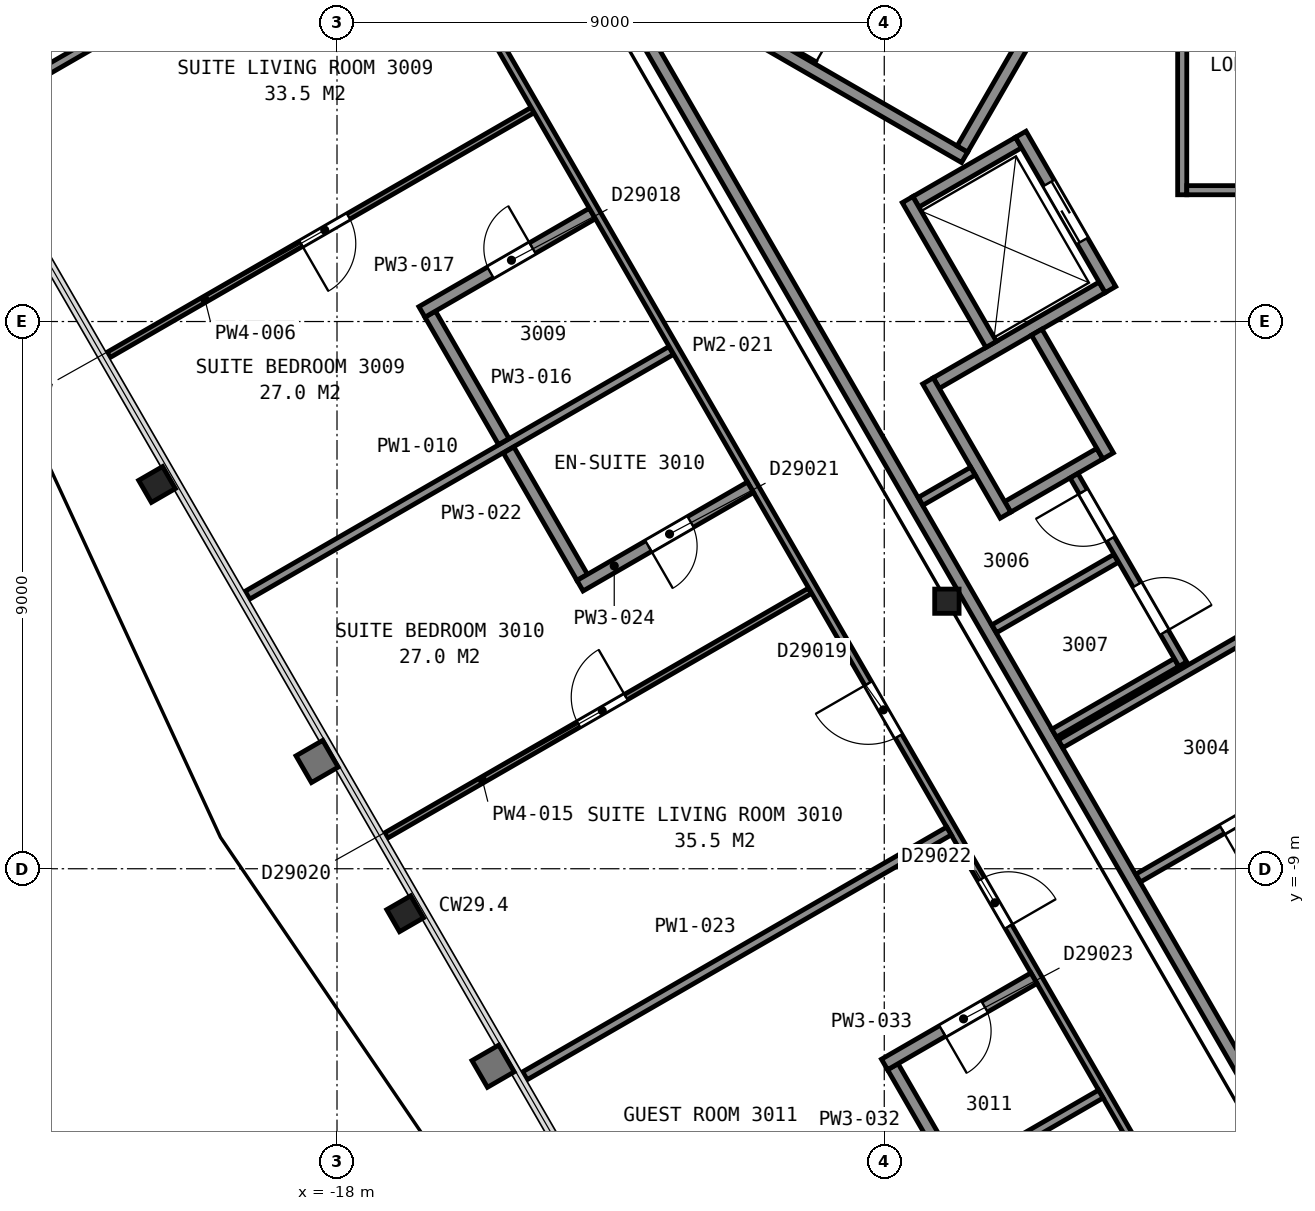
"""IFC4 building model, lengths in metres.
Left out: names, types, materials, properties, quantities, classifications, styles, units other than length and angle.
Written with IfcOpenShell. Run it as: python <this file> out.ifc"""

import sys

from ifc_helpers import new_model, si_unit, direction, frame, frame_2d, origin, origin_2d, place, context, subcontext, project, spatial, rectangle, i_section, extrude, element, fill, save


model = new_model("IFC4")
c1 = context("Model", 3, precision=1e-05, world=origin(), true_north=direction((0.0, 1.0)))
c2 = subcontext(c1, "Body", "Model", "MODEL_VIEW")
j1 = project(units=[si_unit("LENGTHUNIT", "METRE"), si_unit("PLANEANGLEUNIT", "RADIAN")], contexts=[c1])
p1 = place(None, origin())
s1 = spatial("IfcSite", under=j1, at=p1, CompositionType="ELEMENT")
p2 = place(p1, origin())
s2 = spatial("IfcBuilding", under=s1, at=p2, CompositionType="ELEMENT")
p3 = place(p2, frame((0.0, 0.0, 125.2)))
s3 = spatial("IfcBuildingStorey", under=s2, at=p3, CompositionType="ELEMENT", Elevation=125.2)
p4 = place(p3, frame((-20.96, -2.68, 0.0), z_axis=(0.0, 0.0, 1.0), x_axis=(-0.5, 0.866025403784, 0.0)))
e1 = element("IfcColumn", 1, at=p4, inside=s3, PredefinedType="COLUMN", context=c2, shape_type="SweptSolid", body=[
    extrude(i_section(OverallWidth=0.419, OverallDepth=0.455, WebThickness=0.042, FlangeThickness=0.068, FilletRadius=0.015, at=origin_2d()), origin(), (0.0, 0.0, 1.0), 3.56),
])
p5 = place(p3, frame((-16.88, -9.74, 0.0), z_axis=(0.0, 0.0, 1.0), x_axis=(-0.5, 0.866025403784, 0.0)))
e2 = element("IfcColumn", 2, at=p5, inside=s3, PredefinedType="COLUMN", context=c2, shape_type="SweptSolid", body=[
    extrude(i_section(OverallWidth=0.419, OverallDepth=0.455, WebThickness=0.042, FlangeThickness=0.068, FilletRadius=0.015, at=origin_2d()), origin(), (0.0, 0.0, 1.0), 3.565),
])
p6 = place(p3, frame((-7.97, -4.6, 0.0), z_axis=(0.0, 0.0, 1.0), x_axis=(1.0, 0.0, 0.0)))
e3 = element("IfcColumn", 3, at=p6, inside=s3, PredefinedType="COLUMN", context=c2, shape_type="SweptSolid", body=[
    extrude(i_section(OverallWidth=0.401, OverallDepth=0.399, WebThickness=0.025, FlangeThickness=0.04, FilletRadius=0.015, at=origin_2d()), origin(), (0.0, 0.0, 1.0), 3.6),
])
p7 = place(p3, frame((-7.678, 2.701, 0.0), z_axis=(0.0, 0.0, 1.0), x_axis=(-0.866026010844, 0.49999894854, 0.0)))
e4 = element("IfcWall", 4, at=p7, inside=s3, PredefinedType="PARTITIONING", context=c2, shape_type="SweptSolid", body=[
    extrude(rectangle(XDim=12.0, YDim=0.2, at=frame_2d((6.0, 0.0))), origin(), (0.0, 0.0, 1.0), 3.35),
])
p8 = place(p3, frame((-6.315, 5.262, 0.0), z_axis=(0.0, 0.0, 1.0), x_axis=(-0.500049511043, -0.865996816683, 0.0)))
e5 = element("IfcWall", 5, at=p8, inside=s3, PredefinedType="PARTITIONING", context=c2, shape_type="SweptSolid", body=[
    extrude(rectangle(XDim=2.8, YDim=0.2, at=frame_2d((1.4, 0.0))), origin(), (0.0, 0.0, 1.0), 3.35),
])
p9 = place(p3, frame((-6.97, -3.048, 0.0), z_axis=(0.0, 0.0, 1.0), x_axis=(0.866036909293, 0.499980071345, 0.0)))
e6 = element("IfcWall", 6, at=p9, inside=s3, PredefinedType="PARTITIONING", context=c2, shape_type="SweptSolid", body=[
    extrude(rectangle(XDim=1.75, YDim=0.2, at=frame_2d((0.875, 0.0))), origin(), (0.0, 0.0, 1.0), 3.6),
])
p10 = place(p3, frame((-8.145, -1.013, 0.0), z_axis=(0.0, 0.0, 1.0), x_axis=(0.866016494683, 0.500015430699, 0.0)))
e7 = element("IfcWall", 7, at=p10, inside=s3, PredefinedType="PARTITIONING", context=c2, shape_type="SweptSolid", body=[
    extrude(rectangle(XDim=3.15, YDim=0.2, at=frame_2d((1.575, 0.0))), origin(), (0.0, 0.0, 1.0), 3.6),
])
p11 = place(p3, frame((-8.48, 1.969, 0.0), z_axis=(0.0, 0.0, 1.0), x_axis=(0.866000020948, 0.500043961785, 0.0)))
e8 = element("IfcWall", 8, at=p11, inside=s3, PredefinedType="PARTITIONING", context=c2, shape_type="SweptSolid", body=[
    extrude(rectangle(XDim=1.95, YDim=0.2, at=frame_2d((0.975, 0.0))), origin(), (0.0, 0.0, 1.0), 3.6),
])
p12 = place(p3, frame((-5.28, 0.525, 0.0), z_axis=(0.0, 0.0, 1.0), x_axis=(-0.500037662692, 0.866003658127, 0.0)))
e9 = element("IfcWall", 9, at=p12, inside=s3, PredefinedType="PARTITIONING", context=c2, shape_type="SweptSolid", body=[
    extrude(rectangle(XDim=2.95, YDim=0.2, at=frame_2d((1.475, 0.0))), origin(), (0.0, 0.0, 1.0), 3.6),
])
p13 = place(p12, frame((0.925, 0.0, 0.0)))
e10 = element("IfcOpeningElement", 10, at=p13, cuts=e9, PredefinedType="OPENING", context=c2, shape_type="SweptSolid", body=[
    extrude(rectangle(XDim=1.1, YDim=2.1, at=frame_2d((0.55, 1.05))), frame((0.0, 0.11, 0.0), z_axis=(0.0, -1.0, 0.0), x_axis=(1.0, 0.0, 0.0)), (0.0, 0.0, 1.0), 0.22),
])
p14 = place(p3, frame((-5.318, -2.21, 0.0), z_axis=(0.0, 0.0, 1.0), x_axis=(-0.499938297808, 0.866061024631, 0.0)))
e11 = element("IfcWall", 11, at=p14, inside=s3, PredefinedType="PARTITIONING", context=c2, shape_type="SweptSolid", body=[
    extrude(rectangle(XDim=2.35, YDim=0.2, at=frame_2d((1.175, 0.0))), origin(), (0.0, 0.0, 1.0), 3.6),
])
p15 = place(p3, frame((-7.242, -0.376, 0.0), z_axis=(0.0, 0.0, 1.0), x_axis=(-0.499996545922, 0.866027397988, 0.0)))
e12 = element("IfcWall", 12, at=p15, inside=s3, PredefinedType="PARTITIONING", context=c2, shape_type="SweptSolid", body=[
    extrude(rectangle(XDim=2.75, YDim=0.2, at=frame_2d((1.375, 0.0))), origin(), (0.0, 0.0, 1.0), 3.6),
])
p16 = place(p3, frame((-7.006, -3.185, 0.0), z_axis=(0.0, 0.0, 1.0), x_axis=(-0.499990435942, 0.866030925526, 0.0)))
e13 = element("IfcWall", 13, at=p16, inside=s3, PredefinedType="PARTITIONING", context=c2, shape_type="SweptSolid", body=[
    extrude(rectangle(XDim=2.55, YDim=0.2, at=frame_2d((1.275, 0.0))), origin(), (0.0, 0.0, 1.0), 3.6),
])
p17 = place(p3, frame((-13.664, 5.946, 0.0), z_axis=(0.0, 0.0, 1.0), x_axis=(0.499994327219, -0.866028678941, 0.0)))
e14 = element("IfcWall", 14, at=p17, inside=s3, PredefinedType="PARTITIONING", context=c2, shape_type="SweptSolid", body=[
    extrude(rectangle(XDim=23.968, YDim=0.2, at=frame_2d((11.984, 0.0))), origin(), (0.0, 0.0, 1.0), 3.35),
])
p18 = place(p3, frame((-8.402, -2.958, 0.0), z_axis=(0.0, 0.0, 1.0), x_axis=(0.866025935826, 0.499999078476, 0.0)))
e15 = element("IfcWall", 15, at=p18, inside=s3, PredefinedType="PARTITIONING", context=c2, shape_type="SweptSolid", body=[
    extrude(rectangle(XDim=0.993, YDim=0.15, at=frame_2d((0.497, 0.0))), origin(), (0.0, 0.0, 1.0), 3.35),
])
p19 = place(p3, frame((-7.192, -5.053, 0.0), z_axis=(0.0, 0.0, 1.0), x_axis=(0.865851878631, 0.500300434011, 0.0)))
e16 = element("IfcWall", 16, at=p19, inside=s3, PredefinedType="PARTITIONING", context=c2, shape_type="SweptSolid", body=[
    extrude(rectangle(XDim=2.315, YDim=0.15, at=frame_2d((1.158, 0.0))), origin(), (0.0, 0.0, 1.0), 3.35),
])
p20 = place(p3, frame((-6.206, -6.77, 0.0), z_axis=(0.0, 0.0, 1.0), x_axis=(0.865998469481, 0.500046648681, 0.0)))
e17 = element("IfcWall", 17, at=p20, inside=s3, PredefinedType="PARTITIONING", context=c2, shape_type="SweptSolid", body=[
    extrude(rectangle(XDim=2.325, YDim=0.15, at=frame_2d((1.163, 0.0))), origin(), (0.0, 0.0, 1.0), 3.35),
])
p21 = place(p3, frame((-6.1, -6.946, 0.0), z_axis=(0.0, 0.0, 1.0), x_axis=(0.866038200431, 0.499977834903, 0.0)))
e18 = element("IfcWall", 18, at=p21, inside=s3, PredefinedType="PARTITIONING", context=c2, shape_type="SweptSolid", body=[
    extrude(rectangle(XDim=4.22, YDim=0.15, at=frame_2d((2.11, 0.0))), origin(), (0.0, 0.0, 1.0), 3.35),
])
p22 = place(p3, frame((-4.091, -5.635, 0.0), z_axis=(0.0, 0.0, 1.0), x_axis=(-0.499948934428, 0.866054884499, 0.0)))
e19 = element("IfcWall", 19, at=p22, inside=s3, PredefinedType="PARTITIONING", context=c2, shape_type="SweptSolid", body=[
    extrude(rectangle(XDim=3.577, YDim=0.15, at=frame_2d((1.789, 0.0))), origin(), (0.0, 0.0, 1.0), 3.35),
])
p23 = place(p22, frame((2.377, 0.0, 0.0)))
e20 = element("IfcOpeningElement", 20, at=p23, cuts=e19, PredefinedType="OPENING", context=c2, shape_type="SweptSolid", body=[
    extrude(rectangle(XDim=0.9, YDim=2.1, at=frame_2d((0.45, 1.05))), frame((0.0, 0.085, 0.0), z_axis=(0.0, -1.0, 0.0), x_axis=(1.0, 0.0, 0.0)), (0.0, 0.0, 1.0), 0.17),
])
p24 = place(p22, frame((0.605, 0.0, 0.0)))
e21 = element("IfcOpeningElement", 21, at=p24, cuts=e19, PredefinedType="OPENING", context=c2, shape_type="SweptSolid", body=[
    extrude(rectangle(XDim=0.9, YDim=2.1, at=frame_2d((0.45, 1.05))), frame((0.0, 0.085, 0.0), z_axis=(0.0, -1.0, 0.0), x_axis=(1.0, 0.0, 0.0)), (0.0, 0.0, 1.0), 0.17),
])
p25 = place(p3, frame((-4.825, -9.154, 0.0), z_axis=(0.0, 0.0, 1.0), x_axis=(0.866023738697, 0.500002884005, 0.0)))
e22 = element("IfcWall", 22, at=p25, inside=s3, PredefinedType="PARTITIONING", context=c2, shape_type="SweptSolid", body=[
    extrude(rectangle(XDim=4.22, YDim=0.15, at=frame_2d((2.11, 0.0))), origin(), (0.0, 0.0, 1.0), 3.35),
])
p26 = place(p25, frame((1.595, 0.0, 0.0)))
e23 = element("IfcOpeningElement", 23, at=p26, cuts=e22, PredefinedType="OPENING", context=c2, shape_type="SweptSolid", body=[
    extrude(rectangle(XDim=0.9, YDim=2.1, at=frame_2d((0.45, 1.05))), frame((0.0, 0.085, 0.0), z_axis=(0.0, -1.0, 0.0), x_axis=(1.0, 0.0, 0.0)), (0.0, 0.0, 1.0), 0.17),
])
p27 = place(p3, frame((-4.1, 2.085, 0.0), z_axis=(0.0, 0.0, 1.0), x_axis=(0.0, 1.0, 0.0)))
e24 = element("IfcWall", 24, at=p27, inside=s3, PredefinedType="PARTITIONING", context=c2, shape_type="SweptSolid", body=[
    extrude(rectangle(XDim=3.523, YDim=0.15, at=frame_2d((1.761, 0.0))), origin(), (0.0, 0.0, 1.0), 3.35),
])
p28 = place(p3, frame((-4.025, 2.16, 0.0), z_axis=(0.0, 0.0, 1.0), x_axis=(1.0, 0.0, 0.0)))
e25 = element("IfcWall", 25, at=p28, inside=s3, PredefinedType="PARTITIONING", context=c2, shape_type="SweptSolid", body=[
    extrude(rectangle(XDim=1.238, YDim=0.15, at=frame_2d((0.619, 0.0))), origin(), (0.0, 0.0, 1.0), 3.35),
])
p29 = place(p3, frame((-24.037, 3.404, 0.0), z_axis=(0.0, 0.0, 1.0), x_axis=(0.866018103795, 0.50001264374, 0.0)))
e26 = element("IfcWall", 26, at=p29, inside=s3, PredefinedType="PARTITIONING", context=c2, shape_type="SweptSolid", body=[
    extrude(rectangle(XDim=6.433, YDim=0.15, at=frame_2d((3.216, 0.0))), origin(), (0.0, 0.0, 1.0), 2.613),
])
p30 = place(p3, frame((-14.782, 3.478, 0.0), z_axis=(0.0, 0.0, 1.0), x_axis=(-0.866049767202, -0.499957798949, 0.0)))
e27 = element("IfcWall", 27, at=p30, inside=s3, PredefinedType="PARTITIONING", context=c2, shape_type="SweptSolid", body=[
    extrude(rectangle(XDim=8.052, YDim=0.1, at=frame_2d((4.026, 0.0))), origin(), (0.0, 0.0, 1.0), 2.613),
])
p31 = place(p30, frame((3.498, 0.0, 0.0)))
e28 = element("IfcOpeningElement", 28, at=p31, cuts=e27, PredefinedType="OPENING", context=c2, shape_type="SweptSolid", body=[
    extrude(rectangle(XDim=0.9, YDim=2.1, at=frame_2d((0.45, 1.05))), frame((0.0, 0.06, 0.0), z_axis=(0.0, -1.0, 0.0), x_axis=(1.0, 0.0, 0.0)), (0.0, 0.0, 1.0), 0.12),
])
p32 = place(p3, frame((-19.473, -4.501, 0.0), z_axis=(0.0, 0.0, 1.0), x_axis=(0.866005217449, 0.50003496213, 0.0)))
e29 = element("IfcWall", 29, at=p32, inside=s3, PredefinedType="PARTITIONING", context=c2, shape_type="SweptSolid", body=[
    extrude(rectangle(XDim=8.047, YDim=0.15, at=frame_2d((4.024, 0.0))), origin(), (0.0, 0.0, 1.0), 2.613),
])
p33 = place(p3, frame((-17.192, -8.453, 0.0), z_axis=(0.0, 0.0, 1.0), x_axis=(0.865999665789, 0.500044576866, 0.0)))
e30 = element("IfcWall", 30, at=p33, inside=s3, PredefinedType="PARTITIONING", context=c2, shape_type="SweptSolid", body=[
    extrude(rectangle(XDim=8.048, YDim=0.1, at=frame_2d((4.024, 0.0))), origin(), (0.0, 0.0, 1.0), 2.613),
])
p34 = place(p33, frame((3.654, 0.0, 0.0)))
e31 = element("IfcOpeningElement", 31, at=p34, cuts=e30, PredefinedType="OPENING", context=c2, shape_type="SweptSolid", body=[
    extrude(rectangle(XDim=0.9, YDim=2.1, at=frame_2d((0.45, 1.05))), frame((0.0, 0.06, 0.0), z_axis=(0.0, -1.0, 0.0), x_axis=(1.0, 0.0, 0.0)), (0.0, 0.0, 1.0), 0.12),
])
p35 = place(p3, frame((-16.467, 0.121, 0.0), z_axis=(0.0, 0.0, 1.0), x_axis=(0.499894243479, -0.866086453731, 0.0)))
e32 = element("IfcWall", 32, at=p35, inside=s3, PredefinedType="PARTITIONING", context=c2, shape_type="SweptSolid", body=[
    extrude(rectangle(XDim=2.419, YDim=0.2, at=frame_2d((1.21, 0.0))), origin(), (0.0, 0.0, 1.0), 2.613),
])
p36 = place(p3, frame((-13.8, 1.777, 0.0), z_axis=(0.0, 0.0, 1.0), x_axis=(-0.865983377851, -0.500072783988, 0.0)))
e33 = element("IfcWall", 33, at=p36, inside=s3, PredefinedType="PARTITIONING", context=c2, shape_type="SweptSolid", body=[
    extrude(rectangle(XDim=3.237, YDim=0.2, at=frame_2d((1.619, 0.0))), origin(), (0.0, 0.0, 1.0), 2.613),
])
p37 = place(p36, frame((1.137, 0.0, 0.0)))
e34 = element("IfcOpeningElement", 34, at=p37, cuts=e33, PredefinedType="OPENING", context=c2, shape_type="SweptSolid", body=[
    extrude(rectangle(XDim=0.8, YDim=2.1, at=frame_2d((0.4, 1.05))), frame((0.0, 0.11, 0.0), z_axis=(0.0, -1.0, 0.0), x_axis=(1.0, 0.0, 0.0)), (0.0, 0.0, 1.0), 0.22),
])
p38 = place(p3, frame((-3.756, -15.494, 0.0), z_axis=(0.0, 0.0, 1.0), x_axis=(-0.500027787016, 0.866009360349, 0.0)))
e35 = element("IfcWall", 35, at=p38, inside=s3, PredefinedType="PARTITIONING", context=c2, shape_type="SweptSolid", body=[
    extrude(rectangle(XDim=23.856, YDim=0.125, at=frame_2d((11.928, 0.0))), origin(), (0.0, 0.0, 1.0), 2.613),
])
p39 = place(p38, frame((10.016, 0.0, 0.0)))
e36 = element("IfcOpeningElement", 36, at=p39, cuts=e35, PredefinedType="OPENING", context=c2, shape_type="SweptSolid", body=[
    extrude(rectangle(XDim=1.0, YDim=2.1, at=frame_2d((0.5, 1.05))), frame((0.0, 0.073, 0.0), z_axis=(0.0, -1.0, 0.0), x_axis=(1.0, 0.0, 0.0)), (0.0, 0.0, 1.0), 0.145),
])
p40 = place(p38, frame((6.402, 0.0, 0.0)))
e37 = element("IfcOpeningElement", 37, at=p40, cuts=e35, PredefinedType="OPENING", context=c2, shape_type="SweptSolid", body=[
    extrude(rectangle(XDim=0.9, YDim=2.1, at=frame_2d((0.45, 1.05))), frame((0.0, 0.073, 0.0), z_axis=(0.0, -1.0, 0.0), x_axis=(1.0, 0.0, 0.0)), (0.0, 0.0, 1.0), 0.145),
])
p41 = place(p3, frame((-15.177, -2.113, 0.0), z_axis=(0.0, 0.0, 1.0), x_axis=(0.500196916118, -0.865911684357, 0.0)))
e38 = element("IfcWall", 38, at=p41, inside=s3, PredefinedType="PARTITIONING", context=c2, shape_type="SweptSolid", body=[
    extrude(rectangle(XDim=2.42, YDim=0.2, at=frame_2d((1.21, 0.0))), origin(), (0.0, 0.0, 1.0), 2.613),
])
p42 = place(p3, frame((-14.91, -12.405, 0.0), z_axis=(0.0, 0.0, 1.0), x_axis=(0.866044217767, 0.499967411811, 0.0)))
e39 = element("IfcWall", 39, at=p42, inside=s3, PredefinedType="PARTITIONING", context=c2, shape_type="SweptSolid", body=[
    extrude(rectangle(XDim=8.052, YDim=0.15, at=frame_2d((4.026, 0.0))), origin(), (0.0, 0.0, 1.0), 2.613),
])
p43 = place(p3, frame((-14.004, -4.345, 0.0), z_axis=(0.0, 0.0, 1.0), x_axis=(0.866016035791, 0.500016225489, 0.0)))
e40 = element("IfcWall", 40, at=p43, inside=s3, PredefinedType="PARTITIONING", context=c2, shape_type="SweptSolid", body=[
    extrude(rectangle(XDim=3.237, YDim=0.2, at=frame_2d((1.619, 0.0))), origin(), (0.0, 0.0, 1.0), 2.613),
])
p44 = place(p43, frame((1.3, 0.0, 0.0)))
e41 = element("IfcOpeningElement", 41, at=p44, cuts=e40, PredefinedType="OPENING", context=c2, shape_type="SweptSolid", body=[
    extrude(rectangle(XDim=0.8, YDim=2.1, at=frame_2d((0.4, 1.05))), frame((0.0, 0.11, 0.0), z_axis=(0.0, -1.0, 0.0), x_axis=(1.0, 0.0, 0.0)), (0.0, 0.0, 1.0), 0.22),
])
p45 = place(p3, frame((-12.412, -16.732, 0.0), z_axis=(0.0, 0.0, 1.0), x_axis=(0.865997251595, 0.500048757853, 0.0)))
e42 = element("IfcWall", 42, at=p45, inside=s3, PredefinedType="PARTITIONING", context=c2, shape_type="SweptSolid", body=[
    extrude(rectangle(XDim=8.052, YDim=0.15, at=frame_2d((4.026, 0.0))), origin(), (0.0, 0.0, 1.0), 2.613),
])
p46 = place(p3, frame((-8.859, -12.256, 0.0), z_axis=(0.0, 0.0, 1.0), x_axis=(0.499868889286, -0.866101087359, 0.0)))
e43 = element("IfcWall", 43, at=p46, inside=s3, PredefinedType="PARTITIONING", context=c2, shape_type="SweptSolid", body=[
    extrude(rectangle(XDim=2.021, YDim=0.2, at=frame_2d((1.01, 0.0))), origin(), (0.0, 0.0, 1.0), 2.613),
])
p47 = place(p3, frame((-6.538, -10.8, 0.0), z_axis=(0.0, 0.0, 1.0), x_axis=(-0.866048046904, -0.499960778915, 0.0)))
e44 = element("IfcWall", 44, at=p47, inside=s3, PredefinedType="PARTITIONING", context=c2, shape_type="SweptSolid", body=[
    extrude(rectangle(XDim=2.838, YDim=0.2, at=frame_2d((1.419, 0.0))), origin(), (0.0, 0.0, 1.0), 2.613),
])
p48 = place(p47, frame((0.938, 0.0, 0.0)))
e45 = element("IfcOpeningElement", 45, at=p48, cuts=e44, PredefinedType="OPENING", context=c2, shape_type="SweptSolid", body=[
    extrude(rectangle(XDim=0.8, YDim=2.1, at=frame_2d((0.4, 1.05))), frame((0.0, 0.11, 0.0), z_axis=(0.0, -1.0, 0.0), x_axis=(1.0, 0.0, 0.0)), (0.0, 0.0, 1.0), 0.22),
])
p49 = place(p13, origin())
e46 = element("IfcDoor", 46, at=p49, inside=s3, OperationType="SLIDING_TO_LEFT", PredefinedType="DOOR", context=c2, shape_type="SweptSolid", body=[
    extrude(rectangle(XDim=1.1, YDim=2.1, at=frame_2d((0.55, 1.05))), frame((0.0, 0.025, 0.0), z_axis=(0.0, -1.0, 0.0), x_axis=(1.0, 0.0, 0.0)), (0.0, 0.0, 1.0), 0.05),
])
fill(e10, e46)
p50 = place(p23, origin())
e47 = element("IfcDoor", 47, at=p50, inside=s3, OperationType="SINGLE_SWING_RIGHT", PredefinedType="DOOR", context=c2, shape_type="SweptSolid", body=[
    extrude(rectangle(XDim=0.9, YDim=2.1, at=frame_2d((0.45, 1.05))), frame((0.0, 0.025, 0.0), z_axis=(0.0, -1.0, 0.0), x_axis=(1.0, 0.0, 0.0)), (0.0, 0.0, 1.0), 0.05),
])
fill(e20, e47)
p51 = place(p24, origin())
e48 = element("IfcDoor", 48, at=p51, inside=s3, OperationType="SINGLE_SWING_LEFT", PredefinedType="DOOR", context=c2, shape_type="SweptSolid", body=[
    extrude(rectangle(XDim=0.9, YDim=2.1, at=frame_2d((0.45, 1.05))), frame((0.0, 0.025, 0.0), z_axis=(0.0, -1.0, 0.0), x_axis=(1.0, 0.0, 0.0)), (0.0, 0.0, 1.0), 0.05),
])
fill(e21, e48)
p52 = place(p26, origin())
e49 = element("IfcDoor", 49, at=p52, inside=s3, OperationType="SINGLE_SWING_LEFT", PredefinedType="DOOR", context=c2, shape_type="SweptSolid", body=[
    extrude(rectangle(XDim=0.9, YDim=2.1, at=frame_2d((0.45, 1.05))), frame((0.0, 0.025, 0.0), z_axis=(0.0, -1.0, 0.0), x_axis=(1.0, 0.0, 0.0)), (0.0, 0.0, 1.0), 0.05),
])
fill(e23, e49)
p53 = place(p31, origin())
e50 = element("IfcDoor", 50, at=p53, inside=s3, OperationType="SINGLE_SWING_RIGHT", PredefinedType="DOOR", context=c2, shape_type="SweptSolid", body=[
    extrude(rectangle(XDim=0.9, YDim=2.1, at=frame_2d((0.45, 1.05))), frame((0.0, 0.025, 0.0), z_axis=(0.0, -1.0, 0.0), x_axis=(1.0, 0.0, 0.0)), (0.0, 0.0, 1.0), 0.05),
])
fill(e28, e50)
p54 = place(p34, origin())
e51 = element("IfcDoor", 51, at=p54, inside=s3, OperationType="SINGLE_SWING_RIGHT", PredefinedType="DOOR", context=c2, shape_type="SweptSolid", body=[
    extrude(rectangle(XDim=0.9, YDim=2.1, at=frame_2d((0.45, 1.05))), frame((0.0, 0.025, 0.0), z_axis=(0.0, -1.0, 0.0), x_axis=(1.0, 0.0, 0.0)), (0.0, 0.0, 1.0), 0.05),
])
fill(e31, e51)
p55 = place(p37, origin())
e52 = element("IfcDoor", 52, at=p55, inside=s3, OperationType="SINGLE_SWING_LEFT", PredefinedType="DOOR", context=c2, shape_type="SweptSolid", body=[
    extrude(rectangle(XDim=0.8, YDim=2.1, at=frame_2d((0.4, 1.05))), frame((0.0, 0.025, 0.0), z_axis=(0.0, -1.0, 0.0), x_axis=(1.0, 0.0, 0.0)), (0.0, 0.0, 1.0), 0.05),
])
fill(e34, e52)
p56 = place(p39, origin())
e53 = element("IfcDoor", 53, at=p56, inside=s3, OperationType="SINGLE_SWING_RIGHT", PredefinedType="DOOR", context=c2, shape_type="SweptSolid", body=[
    extrude(rectangle(XDim=1.0, YDim=2.1, at=frame_2d((0.5, 1.05))), frame((0.0, 0.025, 0.0), z_axis=(0.0, -1.0, 0.0), x_axis=(1.0, 0.0, 0.0)), (0.0, 0.0, 1.0), 0.05),
])
fill(e36, e53)
p57 = place(p40, origin())
e54 = element("IfcDoor", 54, at=p57, inside=s3, OperationType="SINGLE_SWING_LEFT", PredefinedType="DOOR", context=c2, shape_type="SweptSolid", body=[
    extrude(rectangle(XDim=0.9, YDim=2.1, at=frame_2d((0.45, 1.05))), frame((0.0, 0.025, 0.0), z_axis=(0.0, -1.0, 0.0), x_axis=(1.0, 0.0, 0.0)), (0.0, 0.0, 1.0), 0.05),
])
fill(e37, e54)
p58 = place(p44, origin())
e55 = element("IfcDoor", 55, at=p58, inside=s3, OperationType="SINGLE_SWING_LEFT", PredefinedType="DOOR", context=c2, shape_type="SweptSolid", body=[
    extrude(rectangle(XDim=0.8, YDim=2.1, at=frame_2d((0.4, 1.05))), frame((0.0, 0.025, 0.0), z_axis=(0.0, -1.0, 0.0), x_axis=(1.0, 0.0, 0.0)), (0.0, 0.0, 1.0), 0.05),
])
fill(e41, e55)
p59 = place(p48, origin())
e56 = element("IfcDoor", 56, at=p59, inside=s3, OperationType="SINGLE_SWING_RIGHT", PredefinedType="DOOR", context=c2, shape_type="SweptSolid", body=[
    extrude(rectangle(XDim=0.8, YDim=2.1, at=frame_2d((0.4, 1.05))), frame((0.0, 0.025, 0.0), z_axis=(0.0, -1.0, 0.0), x_axis=(1.0, 0.0, 0.0)), (0.0, 0.0, 1.0), 0.05),
])
fill(e45, e56)
save(model, sys.argv[1])
